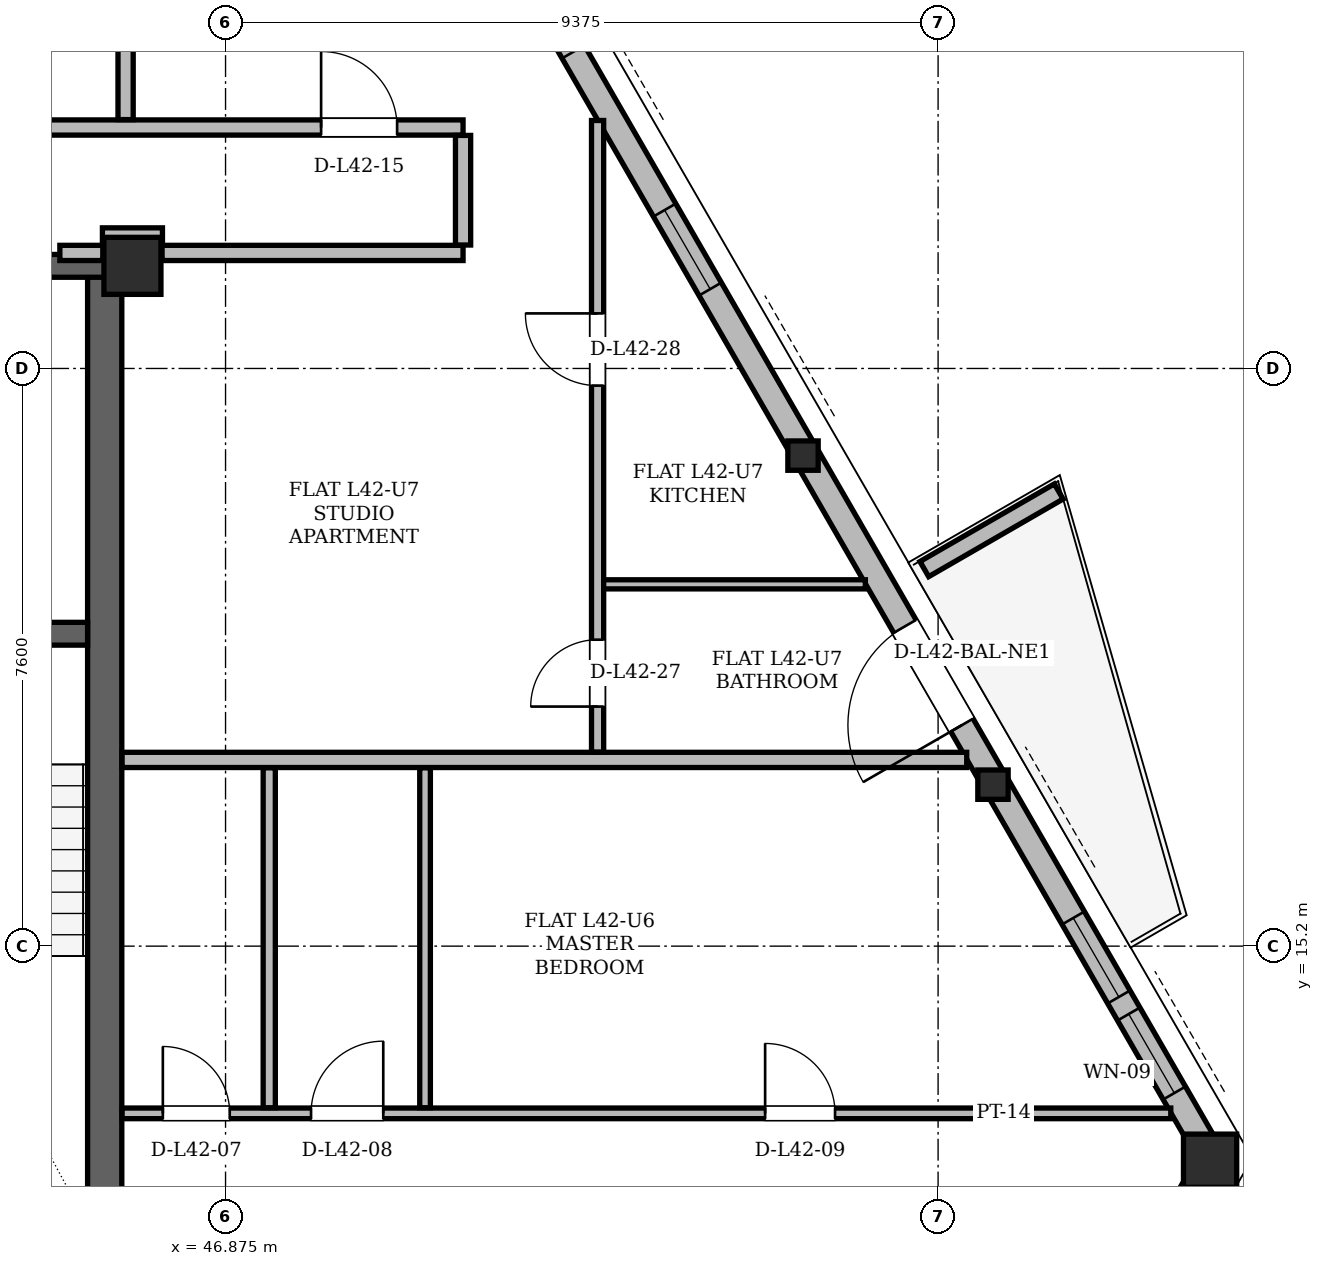
"""IFC4 building model, lengths in metres.
Left out: names, types, materials, properties, quantities, classifications, styles, units other than length and angle.
Written with IfcOpenShell. Run it as: python <this file> out.ifc"""

import sys

from ifc_helpers import new_model, si_unit, direction, frame, frame_2d, origin, origin_2d, place, context, subcontext, project, spatial, polyline, rectangle, hollow_rectangle, i_section, outline, extrude, element, fill, save


model = new_model("IFC4")
c1 = context("Model", 3, precision=1e-05, world=origin(), true_north=direction((0.0, 1.0)))
c2 = subcontext(c1, "Body", "Model", "MODEL_VIEW")
j1 = project(units=[si_unit("LENGTHUNIT", "METRE"), si_unit("PLANEANGLEUNIT", "RADIAN")], contexts=[c1])
p1 = place(None, origin())
s1 = spatial("IfcSite", under=j1, at=p1, CompositionType="ELEMENT")
p2 = place(p1, origin())
s2 = spatial("IfcBuilding", under=s1, at=p2, CompositionType="ELEMENT")
p3 = place(p2, frame((0.0, 0.0, 160.2)))
s3 = spatial("IfcBuildingStorey", under=s2, at=p3, CompositionType="ELEMENT", Elevation=160.2)
p4 = place(p3, frame((45.65, 24.15, 0.0), z_axis=(0.0, 0.0, 1.0), x_axis=(1.0, 0.0, 0.0)))
e1 = element("IfcColumn", 1, at=p4, inside=s3, PredefinedType="COLUMN", context=c2, shape_type="SweptSolid", body=[
    extrude(hollow_rectangle(XDim=0.75, YDim=0.75, WallThickness=0.06, at=origin_2d()), origin(), (0.0, 0.0, 1.0), 3.6),
])
p5 = place(p3, frame((59.853, 12.41, 0.005), z_axis=(-0.013594494866, -0.018352568069, 0.999739152457), x_axis=(0.803557193345, -0.595227550626, 0.0)))
e2 = element("IfcColumn", 2, at=p5, inside=s3, PredefinedType="COLUMN", context=c2, shape_type="SweptSolid", body=[
    extrude(hollow_rectangle(XDim=0.7, YDim=0.7, WallThickness=0.055, at=origin_2d()), origin(), (0.0, 0.0, 1.0), 3.592),
])
p6 = place(p3, frame((56.999, 17.353, 0.005), z_axis=(-0.015022255883, -0.015837943985, 0.99976171729), x_axis=(0.72554342724, -0.688176383777, 0.0)))
e3 = element("IfcColumn", 3, at=p6, inside=s3, PredefinedType="COLUMN", context=c2, shape_type="SweptSolid", body=[
    extrude(i_section(OverallWidth=0.399, OverallDepth=0.386, WebThickness=0.021, FlangeThickness=0.033, at=origin_2d()), origin(), (0.0, 0.0, 1.0), 3.592),
])
p7 = place(p3, frame((54.502, 21.678, 0.005), z_axis=(-0.016313955353, -0.013662937608, 0.999773563862), x_axis=(0.642067671978, -0.766647966541, 0.0)))
e4 = element("IfcColumn", 4, at=p7, inside=s3, PredefinedType="COLUMN", context=c2, shape_type="SweptSolid", body=[
    extrude(i_section(OverallWidth=0.399, OverallDepth=0.386, WebThickness=0.021, FlangeThickness=0.033, at=origin_2d()), origin(), (0.0, 0.0, 1.0), 3.592),
])
p8 = place(p3, frame((45.285, 11.0, 0.0), z_axis=(0.0, 0.0, 1.0), x_axis=(0.0, 1.0, 0.0)))
e5 = element("IfcWall", 5, at=p8, inside=s3, PredefinedType="SHEAR", context=c2, shape_type="SweptSolid", body=[
    extrude(rectangle(XDim=13.3, YDim=0.45, at=frame_2d((6.65, 0.0))), origin(), (0.0, 0.0, 1.0), 3.38),
])
p9 = place(p3, frame((29.65, 24.15, 0.0), z_axis=(0.0, 0.0, 1.0), x_axis=(1.0, 0.0, 0.0)))
e6 = element("IfcWall", 6, at=p9, inside=s3, PredefinedType="SHEAR", context=c2, shape_type="SweptSolid", body=[
    extrude(rectangle(XDim=15.7, YDim=0.3, at=frame_2d((7.85, 0.0))), origin(), (0.0, 0.0, 1.0), 3.38),
])
p10 = place(p9, frame((1.7, 0.0, 0.0)))
e7 = element("IfcOpeningElement", 7, at=p10, cuts=e6, PredefinedType="OPENING", context=c2, shape_type="SweptSolid", body=[
    extrude(rectangle(XDim=1.2, YDim=2.2, at=frame_2d((0.6, 1.1))), frame((0.0, 0.15, 0.0), z_axis=(0.0, -1.0, 0.0), x_axis=(1.0, 0.0, 0.0)), (0.0, 0.0, 1.0), 0.3),
])
p11 = place(p9, frame((12.8, 0.0, 0.0)))
e8 = element("IfcOpeningElement", 8, at=p11, cuts=e6, PredefinedType="OPENING", context=c2, shape_type="SweptSolid", body=[
    extrude(rectangle(XDim=1.2, YDim=2.2, at=frame_2d((0.6, 1.1))), frame((0.0, 0.15, 0.0), z_axis=(0.0, -1.0, 0.0), x_axis=(1.0, 0.0, 0.0)), (0.0, 0.0, 1.0), 0.3),
])
p12 = place(p9, frame((6.55, 0.0, 0.0)))
e9 = element("IfcOpeningElement", 9, at=p12, cuts=e6, PredefinedType="OPENING", context=c2, shape_type="SweptSolid", body=[
    extrude(rectangle(XDim=0.9, YDim=2.05, at=frame_2d((0.45, 1.025))), frame((0.0, 0.15, 0.0), z_axis=(0.0, -1.0, 0.0), x_axis=(1.0, 0.0, 0.0)), (0.0, 0.0, 1.0), 0.3),
])
p13 = place(p9, frame((8.45, 0.0, 0.0)))
e10 = element("IfcOpeningElement", 10, at=p13, cuts=e6, PredefinedType="OPENING", context=c2, shape_type="SweptSolid", body=[
    extrude(rectangle(XDim=0.9, YDim=2.05, at=frame_2d((0.45, 1.025))), frame((0.0, 0.15, 0.0), z_axis=(0.0, -1.0, 0.0), x_axis=(1.0, 0.0, 0.0)), (0.0, 0.0, 1.0), 0.3),
])
p14 = place(p3, frame((41.05, 19.31, 0.0), z_axis=(0.0, 0.0, 1.0), x_axis=(1.0, 0.0, 0.0)))
e11 = element("IfcWall", 11, at=p14, inside=s3, PredefinedType="SHEAR", context=c2, shape_type="SweptSolid", body=[
    extrude(rectangle(XDim=4.01, YDim=0.3, at=frame_2d((2.005, 0.0))), origin(), (0.0, 0.0, 1.0), 3.38),
])
p15 = place(p14, frame((1.6, 0.0, 0.0)))
e12 = element("IfcOpeningElement", 12, at=p15, cuts=e11, PredefinedType="OPENING", context=c2, shape_type="SweptSolid", body=[
    extrude(rectangle(XDim=1.4, YDim=2.2, at=frame_2d((0.7, 1.1))), frame((0.0, 0.15, 0.0), z_axis=(0.0, -1.0, 0.0), x_axis=(1.0, 0.0, 0.0)), (0.0, 0.0, 1.0), 0.3),
])
p16 = place(p3, frame((55.336, 4.587, 0.0), z_axis=(0.0, 0.0, 1.0), x_axis=(0.500007864018, 0.866020863444, 0.0)))
e13 = element("IfcWall", 13, at=p16, inside=s3, PredefinedType="SOLIDWALL", context=c2, shape_type="SweptSolid", body=[
    extrude(rectangle(XDim=9.033, YDim=0.34, at=frame_2d((4.517, 0.0))), origin(), (0.0, 0.0, 1.0), 2.6),
])
p17 = place(p3, frame((59.853, 12.41, 0.0), z_axis=(0.0, 0.0, 1.0), x_axis=(-0.499995364632, 0.866028079999, 0.0)))
e14 = element("IfcWall", 14, at=p17, inside=s3, PredefinedType="SOLIDWALL", context=c2, shape_type="SweptSolid", body=[
    extrude(rectangle(XDim=35.673, YDim=0.34, at=frame_2d((17.836, 0.0))), origin(), (0.0, 0.0, 1.0), 2.6),
])
p18 = place(p17, frame((6.579, 0.0, 0.0)))
e15 = element("IfcOpeningElement", 15, at=p18, cuts=e14, PredefinedType="OPENING", context=c2, shape_type="SweptSolid", body=[
    extrude(rectangle(XDim=1.5, YDim=2.2, at=frame_2d((0.75, 1.1))), frame((0.0, 0.17, 0.0), z_axis=(0.0, -1.0, 0.0), x_axis=(1.0, 0.0, 0.0)), (0.0, 0.0, 1.0), 0.34),
])
p19 = place(p17, frame((26.238, 0.0, 0.0)))
e16 = element("IfcOpeningElement", 16, at=p19, cuts=e14, PredefinedType="OPENING", context=c2, shape_type="SweptSolid", body=[
    extrude(rectangle(XDim=1.3, YDim=2.2, at=frame_2d((0.65, 1.1))), frame((0.0, 0.17, 0.0), z_axis=(0.0, -1.0, 0.0), x_axis=(1.0, 0.0, 0.0)), (0.0, 0.0, 1.0), 0.34),
])
p20 = place(p17, frame((0.99, 0.0, 0.85)))
e17 = element("IfcOpeningElement", 17, at=p20, cuts=e14, PredefinedType="OPENING", context=c2, shape_type="SweptSolid", body=[
    extrude(rectangle(XDim=1.2, YDim=1.48, at=frame_2d((0.6, 0.74))), frame((0.0, 0.17, 0.0), z_axis=(0.0, -1.0, 0.0), x_axis=(1.0, 0.0, 0.0)), (0.0, 0.0, 1.0), 0.34),
])
p21 = place(p17, frame((2.449, 0.0, 0.85)))
e18 = element("IfcOpeningElement", 18, at=p21, cuts=e14, PredefinedType="OPENING", context=c2, shape_type="SweptSolid", body=[
    extrude(rectangle(XDim=1.2, YDim=1.48, at=frame_2d((0.6, 0.74))), frame((0.0, 0.17, 0.0), z_axis=(0.0, -1.0, 0.0), x_axis=(1.0, 0.0, 0.0)), (0.0, 0.0, 1.0), 0.34),
])
p22 = place(p17, frame((16.807, 0.0, 0.85)))
e19 = element("IfcOpeningElement", 19, at=p22, cuts=e14, PredefinedType="OPENING", context=c2, shape_type="SweptSolid", body=[
    extrude(rectangle(XDim=3.0, YDim=1.64, at=frame_2d((1.5, 0.82))), frame((0.0, 0.17, 0.0), z_axis=(0.0, -1.0, 0.0), x_axis=(1.0, 0.0, 0.0)), (0.0, 0.0, 1.0), 0.34),
])
p23 = place(p17, frame((22.859, 0.0, 0.85)))
e20 = element("IfcOpeningElement", 20, at=p23, cuts=e14, PredefinedType="OPENING", context=c2, shape_type="SweptSolid", body=[
    extrude(rectangle(XDim=1.2, YDim=1.48, at=frame_2d((0.6, 0.74))), frame((0.0, 0.17, 0.0), z_axis=(0.0, -1.0, 0.0), x_axis=(1.0, 0.0, 0.0)), (0.0, 0.0, 1.0), 0.34),
])
p24 = place(p17, frame((13.203, 0.0, 0.85)))
e21 = element("IfcOpeningElement", 21, at=p24, cuts=e14, PredefinedType="OPENING", context=c2, shape_type="SweptSolid", body=[
    extrude(rectangle(XDim=1.2, YDim=1.48, at=frame_2d((0.6, 0.74))), frame((0.0, 0.17, 0.0), z_axis=(0.0, -1.0, 0.0), x_axis=(1.0, 0.0, 0.0)), (0.0, 0.0, 1.0), 0.34),
])
p25 = place(p17, frame((31.37, 0.0, 0.85)))
e22 = element("IfcOpeningElement", 22, at=p25, cuts=e14, PredefinedType="OPENING", context=c2, shape_type="SweptSolid", body=[
    extrude(rectangle(XDim=3.0, YDim=1.64, at=frame_2d((1.5, 0.82))), frame((0.0, 0.17, 0.0), z_axis=(0.0, -1.0, 0.0), x_axis=(1.0, 0.0, 0.0)), (0.0, 0.0, 1.0), 0.34),
])
p26 = place(p3, frame((56.069, 20.161, 0.0), z_axis=(0.0, 0.0, 1.0), x_axis=(0.866012356593, 0.500022597718, 0.0)))
e23 = element("IfcWall", 23, at=p26, inside=s3, PredefinedType="PARAPET", context=c2, shape_type="SweptSolid", body=[
    extrude(outline(polyline([(0.0, 0.0), (2.042, 0.0), (2.042, 1.1), (0.0, 1.32), (0.0, 0.0)])), frame((0.0, 0.115, 0.0), z_axis=(0.0, -1.0, 0.0), x_axis=(1.0, 0.0, 0.0)), (0.0, 0.0, 1.0), 0.23),
])
p27 = place(p3, frame((45.514, 13.0, 0.0), z_axis=(0.0, 0.0, 1.0), x_axis=(1.0, 0.0, 0.0)))
e24 = element("IfcWall", 24, at=p27, inside=s3, PredefinedType="PARTITIONING", context=c2, shape_type="SweptSolid", body=[
    extrude(rectangle(XDim=13.798, YDim=0.14, at=frame_2d((6.899, 0.0))), origin(), (0.0, 0.0, 1.0), 2.42),
])
p28 = place(p27, frame((0.536, 0.0, 0.0)))
e25 = element("IfcOpeningElement", 25, at=p28, cuts=e24, PredefinedType="OPENING", context=c2, shape_type="SweptSolid", body=[
    extrude(rectangle(XDim=0.88, YDim=2.08, at=frame_2d((0.44, 1.04))), frame((0.0, 0.07, 0.0), z_axis=(0.0, -1.0, 0.0), x_axis=(1.0, 0.0, 0.0)), (0.0, 0.0, 1.0), 0.14),
])
p29 = place(p27, frame((2.486, 0.0, 0.0)))
e26 = element("IfcOpeningElement", 26, at=p29, cuts=e24, PredefinedType="OPENING", context=c2, shape_type="SweptSolid", body=[
    extrude(rectangle(XDim=0.95, YDim=2.1, at=frame_2d((0.475, 1.05))), frame((0.0, 0.07, 0.0), z_axis=(0.0, -1.0, 0.0), x_axis=(1.0, 0.0, 0.0)), (0.0, 0.0, 1.0), 0.14),
])
p30 = place(p27, frame((8.46, 0.0, 0.0)))
e27 = element("IfcOpeningElement", 27, at=p30, cuts=e24, PredefinedType="OPENING", context=c2, shape_type="SweptSolid", body=[
    extrude(rectangle(XDim=0.92, YDim=2.12, at=frame_2d((0.46, 1.06))), frame((0.0, 0.07, 0.0), z_axis=(0.0, -1.0, 0.0), x_axis=(1.0, 0.0, 0.0)), (0.0, 0.0, 1.0), 0.14),
])
p31 = place(p3, frame((45.514, 17.65, 0.0), z_axis=(0.0, 0.0, 1.0), x_axis=(1.0, 0.0, 0.0)))
e28 = element("IfcWall", 28, at=p31, inside=s3, PredefinedType="PARTITIONING", context=c2, shape_type="SweptSolid", body=[
    extrude(rectangle(XDim=11.113, YDim=0.2, at=frame_2d((5.557, 0.0))), origin(), (0.0, 0.0, 1.0), 2.42),
])
p32 = place(p3, frame((51.773, 19.96, 0.0), z_axis=(0.0, 0.0, 1.0), x_axis=(1.0, 0.0, 0.0)))
e29 = element("IfcWall", 29, at=p32, inside=s3, PredefinedType="PARTITIONING", context=c2, shape_type="SweptSolid", body=[
    extrude(rectangle(XDim=3.52, YDim=0.12, at=frame_2d((1.76, 0.0))), origin(), (0.0, 0.0, 1.0), 3.38),
])
p33 = place(p3, frame((44.695, 24.32, 0.0), z_axis=(0.0, 0.0, 1.0), x_axis=(1.0, 0.0, 0.0)))
e30 = element("IfcWall", 30, at=p33, inside=s3, PredefinedType="PARTITIONING", context=c2, shape_type="SweptSolid", body=[
    extrude(rectangle(XDim=0.565, YDim=0.2, at=frame_2d((0.282, 0.0))), origin(), (0.0, 0.0, 1.0), 2.42),
])
p34 = place(p3, frame((46.04, 24.32, 0.0), z_axis=(0.0, 0.0, 1.0), x_axis=(1.0, 0.0, 0.0)))
e31 = element("IfcWall", 31, at=p34, inside=s3, PredefinedType="PARTITIONING", context=c2, shape_type="SweptSolid", body=[
    extrude(rectangle(XDim=3.96, YDim=0.2, at=frame_2d((1.98, 0.0))), origin(), (0.0, 0.0, 1.0), 3.38),
])
p35 = place(p3, frame((45.255, 24.55, 0.0), z_axis=(0.0, 0.0, 1.0), x_axis=(1.0, 0.0, 0.0)))
e32 = element("IfcWall", 32, at=p35, inside=s3, PredefinedType="PARTITIONING", context=c2, shape_type="SweptSolid", body=[
    extrude(rectangle(XDim=0.79, YDim=0.2, at=frame_2d((0.395, 0.0))), origin(), (0.0, 0.0, 1.0), 2.842),
])
p36 = place(p3, frame((38.3, 25.97, 0.0), z_axis=(0.0, 0.0, 1.0), x_axis=(1.0, 0.0, 0.0)))
e33 = element("IfcWall", 33, at=p36, inside=s3, PredefinedType="PARTITIONING", context=c2, shape_type="SweptSolid", body=[
    extrude(rectangle(XDim=11.7, YDim=0.2, at=frame_2d((5.85, 0.0))), origin(), (0.0, 0.0, 1.0), 2.842),
])
p37 = place(p36, frame((9.832, 0.0, 0.0)))
e34 = element("IfcOpeningElement", 34, at=p37, cuts=e33, PredefinedType="OPENING", context=c2, shape_type="SweptSolid", body=[
    extrude(rectangle(XDim=1.0, YDim=2.18, at=frame_2d((0.5, 1.09))), frame((0.0, 0.1, 0.0), z_axis=(0.0, -1.0, 0.0), x_axis=(1.0, 0.0, 0.0)), (0.0, 0.0, 1.0), 0.2),
])
p38 = place(p3, frame((45.56, 26.074, 0.0), z_axis=(0.0, 0.0, 1.0), x_axis=(0.0, 1.0, 0.0)))
e35 = element("IfcWall", 35, at=p38, inside=s3, PredefinedType="PARTITIONING", context=c2, shape_type="SweptSolid", body=[
    extrude(rectangle(XDim=10.744, YDim=0.2, at=frame_2d((5.372, 0.0))), origin(), (0.0, 0.0, 1.0), 3.38),
])
p39 = place(p3, frame((47.45, 13.074, 0.0), z_axis=(0.0, 0.0, 1.0), x_axis=(0.0, 1.0, 0.0)))
e36 = element("IfcWall", 36, at=p39, inside=s3, PredefinedType="PARTITIONING", context=c2, shape_type="SweptSolid", body=[
    extrude(rectangle(XDim=4.472, YDim=0.16, at=frame_2d((2.236, 0.0))), origin(), (0.0, 0.0, 1.0), 3.38),
])
p40 = place(p3, frame((49.5, 13.074, 0.0), z_axis=(0.0, 0.0, 1.0), x_axis=(0.0, 1.0, 0.0)))
e37 = element("IfcWall", 37, at=p40, inside=s3, PredefinedType="PARTITIONING", context=c2, shape_type="SweptSolid", body=[
    extrude(rectangle(XDim=4.472, YDim=0.14, at=frame_2d((2.236, 0.0))), origin(), (0.0, 0.0, 1.0), 3.38),
])
p41 = place(p3, frame((50.0, 24.424, 0.0), z_axis=(0.0, 0.0, 1.0), x_axis=(0.0, 1.0, 0.0)))
e38 = element("IfcWall", 38, at=p41, inside=s3, PredefinedType="PARTITIONING", context=c2, shape_type="SweptSolid", body=[
    extrude(rectangle(XDim=1.442, YDim=0.2, at=frame_2d((0.721, 0.0))), origin(), (0.0, 0.0, 1.0), 3.38),
])
p42 = place(p3, frame((51.77, 17.754, 0.0), z_axis=(0.0, 0.0, 1.0), x_axis=(0.0, 1.0, 0.0)))
e39 = element("IfcWall", 39, at=p42, inside=s3, PredefinedType="PARTITIONING", context=c2, shape_type="SweptSolid", body=[
    extrude(rectangle(XDim=8.308, YDim=0.16, at=frame_2d((4.154, 0.0))), origin(), (0.0, 0.0, 1.0), 3.38),
])
p43 = place(p42, frame((0.598, 0.0, 0.0)))
e40 = element("IfcOpeningElement", 40, at=p43, cuts=e39, PredefinedType="OPENING", context=c2, shape_type="SweptSolid", body=[
    extrude(rectangle(XDim=0.88, YDim=2.08, at=frame_2d((0.44, 1.04))), frame((0.0, 0.08, 0.0), z_axis=(0.0, -1.0, 0.0), x_axis=(1.0, 0.0, 0.0)), (0.0, 0.0, 1.0), 0.16),
])
p44 = place(p42, frame((4.82, 0.0, 0.0)))
e41 = element("IfcOpeningElement", 41, at=p44, cuts=e39, PredefinedType="OPENING", context=c2, shape_type="SweptSolid", body=[
    extrude(rectangle(XDim=0.95, YDim=2.1, at=frame_2d((0.475, 1.05))), frame((0.0, 0.08, 0.0), z_axis=(0.0, -1.0, 0.0), x_axis=(1.0, 0.0, 0.0)), (0.0, 0.0, 1.0), 0.16),
])
p45 = place(p18, origin())
e42 = element("IfcDoor", 42, at=p45, inside=s3, OperationType="SINGLE_SWING_LEFT", PredefinedType="DOOR", context=c2, shape_type="SweptSolid", body=[
    extrude(rectangle(XDim=1.5, YDim=2.2, at=frame_2d((0.75, 1.1))), frame((0.0, 0.025, 0.0), z_axis=(0.0, -1.0, 0.0), x_axis=(1.0, 0.0, 0.0)), (0.0, 0.0, 1.0), 0.05),
])
fill(e15, e42)
p46 = place(p20, origin())
e43 = element("IfcWindow", 43, at=p46, inside=s3, PartitioningType="SINGLE_PANEL", PredefinedType="WINDOW", context=c2, shape_type="SweptSolid", body=[
    extrude(rectangle(XDim=1.2, YDim=1.48, at=frame_2d((0.6, 0.74))), frame((0.0, 0.03, 0.0), z_axis=(0.0, -1.0, 0.0), x_axis=(1.0, 0.0, 0.0)), (0.0, 0.0, 1.0), 0.06),
])
fill(e17, e43)
p47 = place(p21, origin())
e44 = element("IfcWindow", 44, at=p47, inside=s3, PartitioningType="SINGLE_PANEL", PredefinedType="WINDOW", context=c2, shape_type="SweptSolid", body=[
    extrude(rectangle(XDim=1.2, YDim=1.48, at=frame_2d((0.6, 0.74))), frame((0.0, 0.03, 0.0), z_axis=(0.0, -1.0, 0.0), x_axis=(1.0, 0.0, 0.0)), (0.0, 0.0, 1.0), 0.06),
])
fill(e18, e44)
p48 = place(p22, origin())
e45 = element("IfcWindow", 45, at=p48, inside=s3, PartitioningType="SINGLE_PANEL", PredefinedType="WINDOW", context=c2, shape_type="SweptSolid", body=[
    extrude(rectangle(XDim=3.0, YDim=1.64, at=frame_2d((1.5, 0.82))), frame((0.0, 0.03, 0.0), z_axis=(0.0, -1.0, 0.0), x_axis=(1.0, 0.0, 0.0)), (0.0, 0.0, 1.0), 0.06),
])
fill(e19, e45)
p49 = place(p24, origin())
e46 = element("IfcWindow", 46, at=p49, inside=s3, PartitioningType="SINGLE_PANEL", PredefinedType="WINDOW", context=c2, shape_type="SweptSolid", body=[
    extrude(rectangle(XDim=1.2, YDim=1.48, at=frame_2d((0.6, 0.74))), frame((0.0, 0.03, 0.0), z_axis=(0.0, -1.0, 0.0), x_axis=(1.0, 0.0, 0.0)), (0.0, 0.0, 1.0), 0.06),
])
fill(e21, e46)
p50 = place(p28, origin())
e47 = element("IfcDoor", 47, at=p50, inside=s3, OperationType="SINGLE_SWING_LEFT", PredefinedType="DOOR", context=c2, shape_type="SweptSolid", body=[
    extrude(rectangle(XDim=0.88, YDim=2.08, at=frame_2d((0.44, 1.04))), frame((0.0, 0.025, 0.0), z_axis=(0.0, -1.0, 0.0), x_axis=(1.0, 0.0, 0.0)), (0.0, 0.0, 1.0), 0.05),
])
fill(e25, e47)
p51 = place(p29, origin())
e48 = element("IfcDoor", 48, at=p51, inside=s3, OperationType="SINGLE_SWING_RIGHT", PredefinedType="DOOR", context=c2, shape_type="SweptSolid", body=[
    extrude(rectangle(XDim=0.95, YDim=2.1, at=frame_2d((0.475, 1.05))), frame((0.0, 0.025, 0.0), z_axis=(0.0, -1.0, 0.0), x_axis=(1.0, 0.0, 0.0)), (0.0, 0.0, 1.0), 0.05),
])
fill(e26, e48)
p52 = place(p30, origin())
e49 = element("IfcDoor", 49, at=p52, inside=s3, OperationType="SINGLE_SWING_LEFT", PredefinedType="DOOR", context=c2, shape_type="SweptSolid", body=[
    extrude(rectangle(XDim=0.92, YDim=2.12, at=frame_2d((0.46, 1.06))), frame((0.0, 0.025, 0.0), z_axis=(0.0, -1.0, 0.0), x_axis=(1.0, 0.0, 0.0)), (0.0, 0.0, 1.0), 0.05),
])
fill(e27, e49)
p53 = place(p37, origin())
e50 = element("IfcDoor", 50, at=p53, inside=s3, OperationType="SINGLE_SWING_LEFT", PredefinedType="DOOR", context=c2, shape_type="SweptSolid", body=[
    extrude(rectangle(XDim=1.0, YDim=2.18, at=frame_2d((0.5, 1.09))), frame((0.0, 0.025, 0.0), z_axis=(0.0, -1.0, 0.0), x_axis=(1.0, 0.0, 0.0)), (0.0, 0.0, 1.0), 0.05),
])
fill(e34, e50)
p54 = place(p43, origin())
e51 = element("IfcDoor", 51, at=p54, inside=s3, OperationType="SINGLE_SWING_LEFT", PredefinedType="DOOR", context=c2, shape_type="SweptSolid", body=[
    extrude(rectangle(XDim=0.88, YDim=2.08, at=frame_2d((0.44, 1.04))), frame((0.0, 0.025, 0.0), z_axis=(0.0, -1.0, 0.0), x_axis=(1.0, 0.0, 0.0)), (0.0, 0.0, 1.0), 0.05),
])
fill(e40, e51)
p55 = place(p44, origin())
e52 = element("IfcDoor", 52, at=p55, inside=s3, OperationType="SINGLE_SWING_RIGHT", PredefinedType="DOOR", context=c2, shape_type="SweptSolid", body=[
    extrude(rectangle(XDim=0.95, YDim=2.1, at=frame_2d((0.475, 1.05))), frame((0.0, 0.025, 0.0), z_axis=(0.0, -1.0, 0.0), x_axis=(1.0, 0.0, 0.0)), (0.0, 0.0, 1.0), 0.05),
])
fill(e41, e52)
save(model, sys.argv[1])
